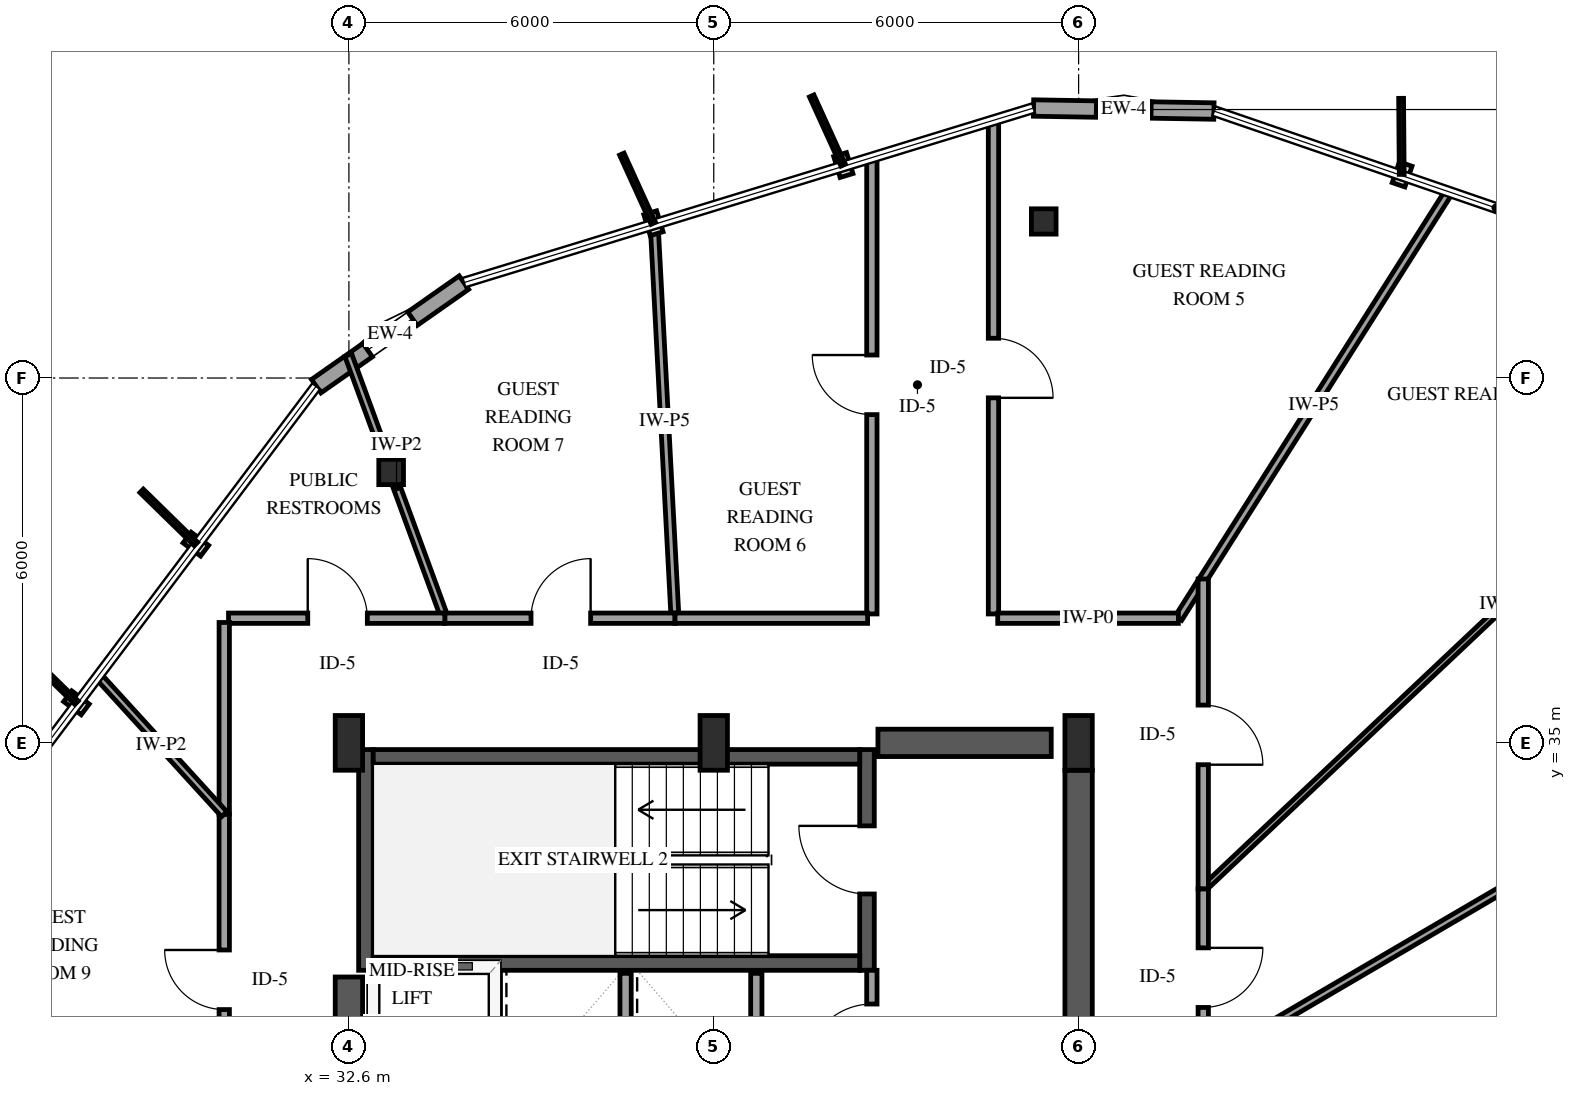
"""IFC4 building model, lengths in metres.
Left out: names, types, materials, properties, quantities, classifications, styles, units other than length and angle.
Written with IfcOpenShell. Run it as: python <this file> out.ifc"""

import sys

from ifc_helpers import new_model, si_unit, direction, frame, frame_2d, origin, origin_2d, place, context, subcontext, project, spatial, rectangle, i_section, extrude, element, fill, save


model = new_model("IFC4")
c1 = context("Model", 3, precision=1e-05, world=origin(), true_north=direction((0.0, 1.0)))
c2 = subcontext(c1, "Body", "Model", "MODEL_VIEW")
j1 = project(units=[si_unit("LENGTHUNIT", "METRE"), si_unit("PLANEANGLEUNIT", "RADIAN")], contexts=[c1])
p1 = place(None, origin())
s1 = spatial("IfcSite", under=j1, at=p1, CompositionType="ELEMENT")
p2 = place(p1, origin())
s2 = spatial("IfcBuilding", under=s1, at=p2, CompositionType="ELEMENT")
p3 = place(p2, frame((0.0, 0.0, 226.6)))
s3 = spatial("IfcBuildingStorey", under=s2, at=p3, CompositionType="ELEMENT", Elevation=226.6)
p4 = place(p3, frame((32.88, 31.26, 0.0), z_axis=(0.0, 0.0, 1.0), x_axis=(0.0, 1.0, 0.0)))
e1 = element("IfcWall", 1, at=p4, inside=s3, PredefinedType="SHEAR", context=c2, shape_type="SweptSolid", body=[
    extrude(rectangle(XDim=3.63, YDim=0.24, at=frame_2d((1.815, 0.0))), origin(), (0.0, 0.0, 1.0), 3.6),
])
p5 = place(p3, frame((41.12, 31.26, 0.0), z_axis=(0.0, 0.0, 1.0), x_axis=(0.0, 1.0, 0.0)))
e2 = element("IfcWall", 2, at=p5, inside=s3, PredefinedType="SHEAR", context=c2, shape_type="SweptSolid", body=[
    extrude(rectangle(XDim=3.63, YDim=0.24, at=frame_2d((1.815, 0.0))), origin(), (0.0, 0.0, 1.0), 3.6),
])
p6 = place(p5, frame((1.255, 0.0, 0.0)))
e3 = element("IfcOpeningElement", 3, at=p6, cuts=e2, PredefinedType="OPENING", context=c2, shape_type="SweptSolid", body=[
    extrude(rectangle(XDim=1.12, YDim=2.15, at=frame_2d((0.56, 1.075))), frame((0.0, 0.13, 0.0), z_axis=(0.0, -1.0, 0.0), x_axis=(1.0, 0.0, 0.0)), (0.0, 0.0, 1.0), 0.26),
])
for number, where, z_axis, x_axis in (
    (4, (33.0, 31.38, 0.0), (0.0, 0.0, 1.0), (1.0, 0.0, 0.0)),
    (5, (33.0, 34.77, 0.0), (0.0, 0.0, 1.0), (1.0, 0.0, 0.0)),
):
    element("IfcWall", number, at=place(p3, frame(where, z_axis=z_axis, x_axis=x_axis)), inside=s3, PredefinedType="SHEAR", context=c2, shape_type="SweptSolid", body=[
        extrude(rectangle(XDim=8.0, YDim=0.24, at=frame_2d((4.0, 0.0))), origin(), (0.0, 0.0, 1.0), 3.6),
    ])
p7 = place(p3, frame((32.6, 18.85, 0.0), z_axis=(0.0, 0.0, 1.0), x_axis=(0.0, 1.0, 0.0)))
e6 = element("IfcWall", 6, at=p7, inside=s3, PredefinedType="SHEAR", context=c2, shape_type="SweptSolid", body=[
    extrude(rectangle(XDim=12.3, YDim=0.45, at=frame_2d((6.15, 0.0))), origin(), (0.0, 0.0, 1.0), 3.6),
])
p8 = place(p3, frame((41.3, 35.0, 0.0), z_axis=(0.0, 0.0, 1.0), x_axis=(1.0, 0.0, 0.0)))
e7 = element("IfcWall", 7, at=p8, inside=s3, PredefinedType="SHEAR", context=c2, shape_type="SweptSolid", body=[
    extrude(rectangle(XDim=2.85, YDim=0.45, at=frame_2d((1.425, 0.0))), origin(), (0.0, 0.0, 1.0), 3.6),
])
p9 = place(p3, frame((44.6, 29.8, 0.0), z_axis=(0.0, 0.0, 1.0), x_axis=(0.0, 1.0, 0.0)))
e8 = element("IfcWall", 8, at=p9, inside=s3, PredefinedType="SHEAR", context=c2, shape_type="SweptSolid", body=[
    extrude(rectangle(XDim=4.75, YDim=0.45, at=frame_2d((2.375, 0.0))), origin(), (0.0, 0.0, 1.0), 3.6),
])
for number, where, z_axis, x_axis in (
    (9, (32.6, 35.0, 0.0), (0.0, 0.0, 1.0), (1.0, 0.0, 0.0)),
    (10, (38.6, 35.0, 0.0), (0.0, 0.0, 1.0), (1.0, 0.0, 0.0)),
    (11, (44.6, 35.0, 0.0), (0.0, 0.0, 1.0), (1.0, 0.0, 0.0)),
):
    element("IfcColumn", number, at=place(p3, frame(where, z_axis=z_axis, x_axis=x_axis)), inside=s3, PredefinedType="PILASTER", context=c2, shape_type="SweptSolid", body=[
        extrude(rectangle(XDim=0.45, YDim=0.9, at=origin_2d()), origin(), (0.0, 0.0, 1.0), 3.6),
    ])
for number, where, z_axis, x_axis in (
    (12, (44.027, 43.574, 0.0), (0.0, 0.0, 1.0), (1.0, 0.0, 0.0)),
    (13, (33.295, 39.455, 0.0), (0.0, 0.0, 1.0), (1.0, 0.0, 0.0)),
):
    element("IfcColumn", number, at=place(p3, frame(where, z_axis=z_axis, x_axis=x_axis)), inside=s3, PredefinedType="COLUMN", context=c2, shape_type="SweptSolid", body=[
        extrude(i_section(OverallWidth=0.406, OverallDepth=0.416, WebThickness=0.03, FlangeThickness=0.048, FilletRadius=0.038, at=origin_2d()), origin(), (0.0, 0.0, 1.0), 3.6),
    ])
p10 = place(p3, frame((46.825, 45.39, 0.0), z_axis=(0.0, 0.0, 1.0), x_axis=(-0.999860453609, 0.016705487414, 0.0)))
e14 = element("IfcWall", 14, at=p10, inside=s3, PredefinedType="SOLIDWALL", context=c2, shape_type="SweptSolid", body=[
    extrude(rectangle(XDim=2.967, YDim=0.27, at=frame_2d((1.483, 0.0))), origin(), (0.0, 0.0, 1.0), 2.679),
])
p11 = place(p10, frame((1.033, 0.0, 0.75)))
e15 = element("IfcOpeningElement", 15, at=p11, cuts=e14, PredefinedType="OPENING", context=c2, shape_type="SweptSolid", body=[
    extrude(rectangle(XDim=0.9, YDim=1.5, at=frame_2d((0.45, 0.75))), frame((0.0, 0.145, 0.0), z_axis=(0.0, -1.0, 0.0), x_axis=(1.0, 0.0, 0.0)), (0.0, 0.0, 1.0), 0.29),
])
p12 = place(p3, frame((34.491, 42.569, 0.0), z_axis=(0.0, 0.0, 1.0), x_axis=(-0.818779304738, -0.574108395804, 0.0)))
e16 = element("IfcWall", 16, at=p12, inside=s3, PredefinedType="SOLIDWALL", context=c2, shape_type="SweptSolid", body=[
    extrude(rectangle(XDim=2.967, YDim=0.27, at=frame_2d((1.483, 0.0))), origin(), (0.0, 0.0, 1.0), 2.679),
])
p13 = place(p12, frame((1.033, 0.0, 0.75)))
e17 = element("IfcOpeningElement", 17, at=p13, cuts=e16, PredefinedType="OPENING", context=c2, shape_type="SweptSolid", body=[
    extrude(rectangle(XDim=0.9, YDim=1.5, at=frame_2d((0.45, 0.75))), frame((0.0, 0.145, 0.0), z_axis=(0.0, -1.0, 0.0), x_axis=(1.0, 0.0, 0.0)), (0.0, 0.0, 1.0), 0.29),
])
for number, where, z_axis, x_axis in (
    (18, (35.0, 29.11, 0.0), (0.0, 0.0, 1.0), (0.0, 1.0, 0.0)),
    (19, (37.15, 29.11, 0.0), (0.0, 0.0, 1.0), (0.0, 1.0, 0.0)),
    (20, (39.3, 29.11, 0.0), (0.0, 0.0, 1.0), (0.0, 1.0, 0.0)),
):
    element("IfcWall", number, at=place(p3, frame(where, z_axis=z_axis, x_axis=x_axis)), inside=s3, PredefinedType="SOLIDWALL", context=c2, shape_type="SweptSolid", body=[
        extrude(rectangle(XDim=2.1, YDim=0.185, at=frame_2d((1.05, 0.0))), origin(), (0.0, 0.0, 1.0), 3.3),
    ])
p14 = place(p3, frame((46.65, 27.258, 0.0), z_axis=(0.0, 0.0, 1.0), x_axis=(0.962850255887, 0.270035895277, 0.0)))
e21 = element("IfcWall", 21, at=p14, inside=s3, PredefinedType="PARTITIONING", context=c2, shape_type="SweptSolid", body=[
    extrude(rectangle(XDim=18.223, YDim=0.14, at=frame_2d((9.112, 0.0))), origin(), (0.0, 0.0, 1.0), 3.3),
])
p15 = place(p3, frame((46.65, 29.711, 0.0), z_axis=(0.0, 0.0, 1.0), x_axis=(0.863115514212, 0.505006543648, 0.0)))
e22 = element("IfcWall", 22, at=p15, inside=s3, PredefinedType="PARTITIONING", context=c2, shape_type="SweptSolid", body=[
    extrude(rectangle(XDim=15.875, YDim=0.12, at=frame_2d((7.938, 0.0))), origin(), (0.0, 0.0, 1.0), 3.3),
])
p16 = place(p3, frame((46.65, 32.597, 0.0), z_axis=(0.0, 0.0, 1.0), x_axis=(0.72733783117, 0.686279592695, 0.0)))
e23 = element("IfcWall", 23, at=p16, inside=s3, PredefinedType="PARTITIONING", context=c2, shape_type="SweptSolid", body=[
    extrude(rectangle(XDim=13.635, YDim=0.1, at=frame_2d((6.817, 0.0))), origin(), (0.0, 0.0, 1.0), 2.595),
])
p17 = place(p3, frame((46.241, 37.05, 0.0), z_axis=(0.0, 0.0, 1.0), x_axis=(0.535691842885, 0.844413553578, 0.0)))
e24 = element("IfcWall", 24, at=p17, inside=s3, PredefinedType="PARTITIONING", context=c2, shape_type="SweptSolid", body=[
    extrude(rectangle(XDim=8.305, YDim=0.13, at=frame_2d((4.153, 0.0))), origin(), (0.0, 0.0, 1.0), 3.3),
])
p18 = place(p3, frame((43.2, 45.238, 0.0), z_axis=(0.0, 0.0, 1.0), x_axis=(0.0, -1.0, 0.0)))
e25 = element("IfcWall", 25, at=p18, inside=s3, PredefinedType="PARTITIONING", context=c2, shape_type="SweptSolid", body=[
    extrude(rectangle(XDim=8.118, YDim=0.17, at=frame_2d((4.059, 0.0))), origin(), (0.0, 0.0, 1.0), 2.595),
])
p19 = place(p18, frame((3.584, 0.0, 0.0)))
e26 = element("IfcOpeningElement", 26, at=p19, cuts=e25, PredefinedType="OPENING", context=c2, shape_type="SweptSolid", body=[
    extrude(rectangle(XDim=0.98, YDim=2.15, at=frame_2d((0.49, 1.075))), frame((0.0, 0.095, 0.0), z_axis=(0.0, -1.0, 0.0), x_axis=(1.0, 0.0, 0.0)), (0.0, 0.0, 1.0), 0.19),
])
p20 = place(p3, frame((41.2, 37.12, 0.0), z_axis=(0.0, 0.0, 1.0), x_axis=(0.0, 1.0, 0.0)))
e27 = element("IfcWall", 27, at=p20, inside=s3, PredefinedType="PARTITIONING", context=c2, shape_type="SweptSolid", body=[
    extrude(rectangle(XDim=7.505, YDim=0.17, at=frame_2d((3.752, 0.0))), origin(), (0.0, 0.0, 1.0), 3.3),
])
p21 = place(p20, frame((3.278, 0.0, 0.0)))
e28 = element("IfcOpeningElement", 28, at=p21, cuts=e27, PredefinedType="OPENING", context=c2, shape_type="SweptSolid", body=[
    extrude(rectangle(XDim=0.98, YDim=2.15, at=frame_2d((0.49, 1.075))), frame((0.0, 0.095, 0.0), z_axis=(0.0, -1.0, 0.0), x_axis=(1.0, 0.0, 0.0)), (0.0, 0.0, 1.0), 0.19),
])
p22 = place(p3, frame((37.963, 37.05, 0.0), z_axis=(0.0, 0.0, 1.0), x_axis=(-0.052839325019, 0.998603027099, 0.0)))
e29 = element("IfcWall", 29, at=p22, inside=s3, PredefinedType="PARTITIONING", context=c2, shape_type="SweptSolid", body=[
    extrude(rectangle(XDim=6.487, YDim=0.13, at=frame_2d((3.244, 0.0))), origin(), (0.0, 0.0, 1.0), 3.3),
])
p23 = place(p3, frame((30.55, 28.351, 0.0), z_axis=(0.0, 0.0, 1.0), x_axis=(-0.923298813855, 0.384082413467, 0.0)))
e30 = element("IfcWall", 30, at=p23, inside=s3, PredefinedType="PARTITIONING", context=c2, shape_type="SweptSolid", body=[
    extrude(rectangle(XDim=5.725, YDim=0.12, at=frame_2d((2.863, 0.0))), origin(), (0.0, 0.0, 1.0), 3.3),
])
p24 = place(p3, frame((30.55, 28.351, 0.0), z_axis=(0.0, 0.0, 1.0), x_axis=(0.0, 1.0, 0.0)))
e31 = element("IfcWall", 31, at=p24, inside=s3, PredefinedType="PARTITIONING", context=c2, shape_type="SweptSolid", body=[
    extrude(rectangle(XDim=5.476, YDim=0.17, at=frame_2d((2.738, 0.0))), origin(), (0.0, 0.0, 1.0), 3.3),
])
p25 = place(p24, frame((2.263, 0.0, 0.0)))
e32 = element("IfcOpeningElement", 32, at=p25, cuts=e31, PredefinedType="OPENING", context=c2, shape_type="SweptSolid", body=[
    extrude(rectangle(XDim=0.98, YDim=2.15, at=frame_2d((0.49, 1.075))), frame((0.0, 0.095, 0.0), z_axis=(0.0, -1.0, 0.0), x_axis=(1.0, 0.0, 0.0)), (0.0, 0.0, 1.0), 0.19),
])
p26 = place(p3, frame((46.65, 37.695, 0.0), z_axis=(0.0, 0.0, 1.0), x_axis=(0.0, -1.0, 0.0)))
e33 = element("IfcWall", 33, at=p26, inside=s3, PredefinedType="PARTITIONING", context=c2, shape_type="SweptSolid", body=[
    extrude(rectangle(XDim=5.098, YDim=0.17, at=frame_2d((2.549, 0.0))), origin(), (0.0, 0.0, 1.0), 3.3),
])
p27 = place(p26, frame((2.074, 0.0, 0.0)))
e34 = element("IfcOpeningElement", 34, at=p27, cuts=e33, PredefinedType="OPENING", context=c2, shape_type="SweptSolid", body=[
    extrude(rectangle(XDim=0.98, YDim=2.15, at=frame_2d((0.49, 1.075))), frame((0.0, 0.095, 0.0), z_axis=(0.0, -1.0, 0.0), x_axis=(1.0, 0.0, 0.0)), (0.0, 0.0, 1.0), 0.19),
])
p28 = place(p3, frame((34.177, 37.05, 0.0), z_axis=(0.0, 0.0, 1.0), x_axis=(-0.344396316594, 0.938824359035, 0.0)))
e35 = element("IfcWall", 35, at=p28, inside=s3, PredefinedType="PARTITIONING", context=c2, shape_type="SweptSolid", body=[
    extrude(rectangle(XDim=4.608, YDim=0.12, at=frame_2d((2.304, 0.0))), origin(), (0.0, 0.0, 1.0), 2.595),
])
p29 = place(p3, frame((34.177, 37.05, 0.0), z_axis=(0.0, 0.0, 1.0), x_axis=(1.0, 0.0, 0.0)))
e36 = element("IfcWall", 36, at=p29, inside=s3, PredefinedType="PARTITIONING", context=c2, shape_type="SweptSolid", body=[
    extrude(rectangle(XDim=3.786, YDim=0.17, at=frame_2d((1.893, 0.0))), origin(), (0.0, 0.0, 1.0), 3.3),
])
p30 = place(p29, frame((1.418, 0.0, 0.0)))
e37 = element("IfcOpeningElement", 37, at=p30, cuts=e36, PredefinedType="OPENING", context=c2, shape_type="SweptSolid", body=[
    extrude(rectangle(XDim=0.98, YDim=2.15, at=frame_2d((0.49, 1.075))), frame((0.0, 0.095, 0.0), z_axis=(0.0, -1.0, 0.0), x_axis=(1.0, 0.0, 0.0)), (0.0, 0.0, 1.0), 0.19),
])
p31 = place(p3, frame((30.62, 37.05, 0.0), z_axis=(0.0, 0.0, 1.0), x_axis=(1.0, 0.0, 0.0)))
e38 = element("IfcWall", 38, at=p31, inside=s3, PredefinedType="PARTITIONING", context=c2, shape_type="SweptSolid", body=[
    extrude(rectangle(XDim=3.557, YDim=0.17, at=frame_2d((1.778, 0.0))), origin(), (0.0, 0.0, 1.0), 3.3),
])
p32 = place(p31, frame((1.303, 0.0, 0.0)))
e39 = element("IfcOpeningElement", 39, at=p32, cuts=e38, PredefinedType="OPENING", context=c2, shape_type="SweptSolid", body=[
    extrude(rectangle(XDim=0.98, YDim=2.15, at=frame_2d((0.49, 1.075))), frame((0.0, 0.095, 0.0), z_axis=(0.0, -1.0, 0.0), x_axis=(1.0, 0.0, 0.0)), (0.0, 0.0, 1.0), 0.19),
])
p33 = place(p3, frame((37.963, 37.05, 0.0), z_axis=(0.0, 0.0, 1.0), x_axis=(1.0, 0.0, 0.0)))
e40 = element("IfcWall", 40, at=p33, inside=s3, PredefinedType="PARTITIONING", context=c2, shape_type="SweptSolid", body=[
    extrude(rectangle(XDim=3.167, YDim=0.17, at=frame_2d((1.583, 0.0))), origin(), (0.0, 0.0, 1.0), 3.3),
])
p34 = place(p3, frame((30.55, 33.827, 0.0), z_axis=(0.0, 0.0, 1.0), x_axis=(0.0, 1.0, 0.0)))
e41 = element("IfcWall", 41, at=p34, inside=s3, PredefinedType="PARTITIONING", context=c2, shape_type="SweptSolid", body=[
    extrude(rectangle(XDim=3.153, YDim=0.17, at=frame_2d((1.577, 0.0))), origin(), (0.0, 0.0, 1.0), 3.3),
])
p35 = place(p3, frame((30.55, 33.827, 0.0), z_axis=(0.0, 0.0, 1.0), x_axis=(-0.673663383487, 0.739038324953, 0.0)))
e42 = element("IfcWall", 42, at=p35, inside=s3, PredefinedType="PARTITIONING", context=c2, shape_type="SweptSolid", body=[
    extrude(rectangle(XDim=3.077, YDim=0.12, at=frame_2d((1.539, 0.0))), origin(), (0.0, 0.0, 1.0), 3.3),
])
p36 = place(p3, frame((43.27, 37.05, 0.0), z_axis=(0.0, 0.0, 1.0), x_axis=(1.0, 0.0, 0.0)))
e43 = element("IfcWall", 43, at=p36, inside=s3, PredefinedType="PARTITIONING", context=c2, shape_type="SweptSolid", body=[
    extrude(rectangle(XDim=2.971, YDim=0.17, at=frame_2d((1.485, 0.0))), origin(), (0.0, 0.0, 1.0), 3.3),
])
p37 = place(p3, frame((46.65, 32.597, 0.0), z_axis=(0.0, 0.0, 1.0), x_axis=(0.0, -1.0, 0.0)))
e44 = element("IfcWall", 44, at=p37, inside=s3, PredefinedType="PARTITIONING", context=c2, shape_type="SweptSolid", body=[
    extrude(rectangle(XDim=2.886, YDim=0.17, at=frame_2d((1.443, 0.0))), origin(), (0.0, 0.0, 1.0), 3.3),
])
p38 = place(p37, frame((0.968, 0.0, 0.0)))
e45 = element("IfcOpeningElement", 45, at=p38, cuts=e44, PredefinedType="OPENING", context=c2, shape_type="SweptSolid", body=[
    extrude(rectangle(XDim=0.98, YDim=2.15, at=frame_2d((0.49, 1.075))), frame((0.0, 0.095, 0.0), z_axis=(0.0, -1.0, 0.0), x_axis=(1.0, 0.0, 0.0)), (0.0, 0.0, 1.0), 0.19),
])
p39 = place(p3, frame((41.2, 29.07, 0.0), z_axis=(0.0, 0.0, 1.0), x_axis=(0.0, 1.0, 0.0)))
e46 = element("IfcWall", 46, at=p39, inside=s3, PredefinedType="PARTITIONING", context=c2, shape_type="SweptSolid", body=[
    extrude(rectangle(XDim=2.19, YDim=0.17, at=frame_2d((1.095, 0.0))), origin(), (0.0, 0.0, 1.0), 3.3),
])
p40 = place(p39, frame((0.555, 0.0, 0.0)))
e47 = element("IfcOpeningElement", 47, at=p40, cuts=e46, PredefinedType="OPENING", context=c2, shape_type="SweptSolid", body=[
    extrude(rectangle(XDim=1.08, YDim=2.15, at=frame_2d((0.54, 1.075))), frame((0.0, 0.095, 0.0), z_axis=(0.0, -1.0, 0.0), x_axis=(1.0, 0.0, 0.0)), (0.0, 0.0, 1.0), 0.19),
])
p41 = place(p11, origin())
e48 = element("IfcWindow", 48, at=p41, inside=s3, PartitioningType="SINGLE_PANEL", PredefinedType="WINDOW", context=c2, shape_type="SweptSolid", body=[
    extrude(rectangle(XDim=0.9, YDim=1.5, at=frame_2d((0.45, 0.75))), frame((0.0, 0.03, 0.0), z_axis=(0.0, -1.0, 0.0), x_axis=(1.0, 0.0, 0.0)), (0.0, 0.0, 1.0), 0.06),
])
fill(e15, e48)
p42 = place(p13, origin())
e49 = element("IfcWindow", 49, at=p42, inside=s3, PartitioningType="SINGLE_PANEL", PredefinedType="WINDOW", context=c2, shape_type="SweptSolid", body=[
    extrude(rectangle(XDim=0.9, YDim=1.5, at=frame_2d((0.45, 0.75))), frame((0.0, 0.03, 0.0), z_axis=(0.0, -1.0, 0.0), x_axis=(1.0, 0.0, 0.0)), (0.0, 0.0, 1.0), 0.06),
])
fill(e17, e49)
p43 = place(p6, origin())
e50 = element("IfcDoor", 50, at=p43, inside=s3, OperationType="SINGLE_SWING_RIGHT", PredefinedType="DOOR", context=c2, shape_type="SweptSolid", body=[
    extrude(rectangle(XDim=1.12, YDim=2.15, at=frame_2d((0.56, 1.075))), frame((0.0, 0.025, 0.0), z_axis=(0.0, -1.0, 0.0), x_axis=(1.0, 0.0, 0.0)), (0.0, 0.0, 1.0), 0.05),
])
fill(e3, e50)
p44 = place(p19, origin())
e51 = element("IfcDoor", 51, at=p44, inside=s3, OperationType="SINGLE_SWING_RIGHT", PredefinedType="DOOR", context=c2, shape_type="SweptSolid", body=[
    extrude(rectangle(XDim=0.98, YDim=2.15, at=frame_2d((0.49, 1.075))), frame((0.0, 0.025, 0.0), z_axis=(0.0, -1.0, 0.0), x_axis=(1.0, 0.0, 0.0)), (0.0, 0.0, 1.0), 0.05),
])
fill(e26, e51)
p45 = place(p21, origin())
e52 = element("IfcDoor", 52, at=p45, inside=s3, OperationType="SINGLE_SWING_RIGHT", PredefinedType="DOOR", context=c2, shape_type="SweptSolid", body=[
    extrude(rectangle(XDim=0.98, YDim=2.15, at=frame_2d((0.49, 1.075))), frame((0.0, 0.025, 0.0), z_axis=(0.0, -1.0, 0.0), x_axis=(1.0, 0.0, 0.0)), (0.0, 0.0, 1.0), 0.05),
])
fill(e28, e52)
p46 = place(p25, origin())
e53 = element("IfcDoor", 53, at=p46, inside=s3, OperationType="SINGLE_SWING_RIGHT", PredefinedType="DOOR", context=c2, shape_type="SweptSolid", body=[
    extrude(rectangle(XDim=0.98, YDim=2.15, at=frame_2d((0.49, 1.075))), frame((0.0, 0.025, 0.0), z_axis=(0.0, -1.0, 0.0), x_axis=(1.0, 0.0, 0.0)), (0.0, 0.0, 1.0), 0.05),
])
fill(e32, e53)
p47 = place(p27, origin())
e54 = element("IfcDoor", 54, at=p47, inside=s3, OperationType="SINGLE_SWING_RIGHT", PredefinedType="DOOR", context=c2, shape_type="SweptSolid", body=[
    extrude(rectangle(XDim=0.98, YDim=2.15, at=frame_2d((0.49, 1.075))), frame((0.0, 0.025, 0.0), z_axis=(0.0, -1.0, 0.0), x_axis=(1.0, 0.0, 0.0)), (0.0, 0.0, 1.0), 0.05),
])
fill(e34, e54)
p48 = place(p30, origin())
e55 = element("IfcDoor", 55, at=p48, inside=s3, OperationType="SINGLE_SWING_RIGHT", PredefinedType="DOOR", context=c2, shape_type="SweptSolid", body=[
    extrude(rectangle(XDim=0.98, YDim=2.15, at=frame_2d((0.49, 1.075))), frame((0.0, 0.025, 0.0), z_axis=(0.0, -1.0, 0.0), x_axis=(1.0, 0.0, 0.0)), (0.0, 0.0, 1.0), 0.05),
])
fill(e37, e55)
p49 = place(p32, origin())
e56 = element("IfcDoor", 56, at=p49, inside=s3, OperationType="SINGLE_SWING_LEFT", PredefinedType="DOOR", context=c2, shape_type="SweptSolid", body=[
    extrude(rectangle(XDim=0.98, YDim=2.15, at=frame_2d((0.49, 1.075))), frame((0.0, 0.025, 0.0), z_axis=(0.0, -1.0, 0.0), x_axis=(1.0, 0.0, 0.0)), (0.0, 0.0, 1.0), 0.05),
])
fill(e39, e56)
p50 = place(p38, origin())
e57 = element("IfcDoor", 57, at=p50, inside=s3, OperationType="SINGLE_SWING_LEFT", PredefinedType="DOOR", context=c2, shape_type="SweptSolid", body=[
    extrude(rectangle(XDim=0.98, YDim=2.15, at=frame_2d((0.49, 1.075))), frame((0.0, 0.025, 0.0), z_axis=(0.0, -1.0, 0.0), x_axis=(1.0, 0.0, 0.0)), (0.0, 0.0, 1.0), 0.05),
])
fill(e45, e57)
p51 = place(p40, origin())
e58 = element("IfcDoor", 58, at=p51, inside=s3, OperationType="SINGLE_SWING_LEFT", PredefinedType="DOOR", context=c2, shape_type="SweptSolid", body=[
    extrude(rectangle(XDim=1.08, YDim=2.15, at=frame_2d((0.54, 1.075))), frame((0.0, 0.025, 0.0), z_axis=(0.0, -1.0, 0.0), x_axis=(1.0, 0.0, 0.0)), (0.0, 0.0, 1.0), 0.05),
])
fill(e47, e58)
save(model, sys.argv[1])
